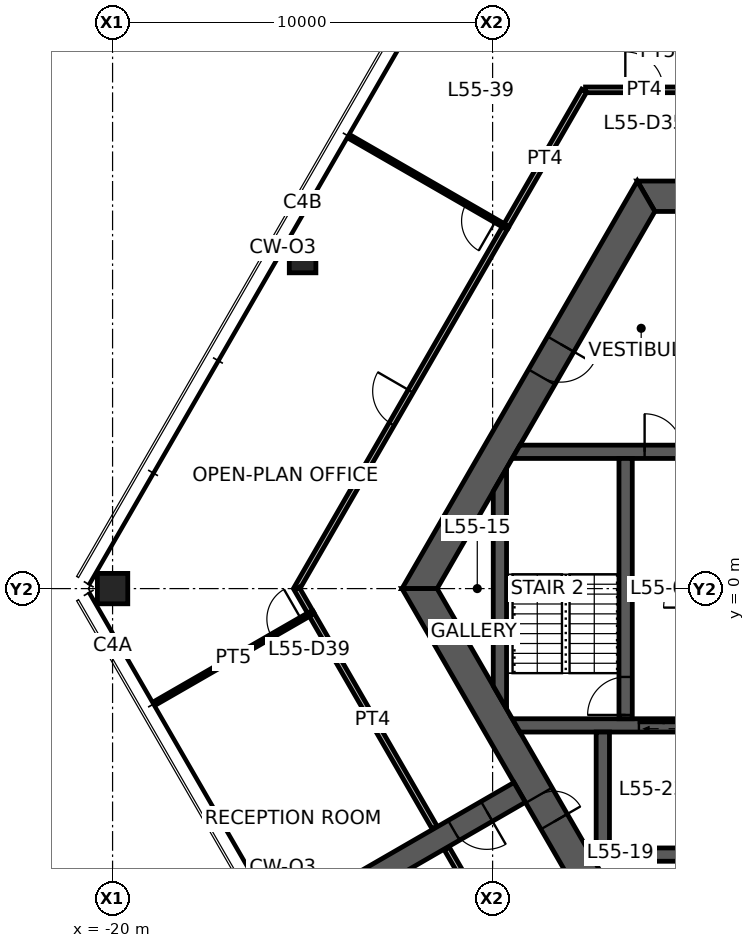
"""IFC4 building model, lengths in metres.
Left out: names, types, materials, properties, quantities, classifications, styles, units other than length and angle.
Written with IfcOpenShell. Run it as: python <this file> out.ifc"""

import sys

from ifc_helpers import new_model, si_unit, direction, frame, frame_2d, origin, origin_2d, place, context, subcontext, project, spatial, polyline, rectangle, hollow_rectangle, outline, extrude, element, fill, save


model = new_model("IFC4")
c1 = context("Model", 3, precision=1e-05, world=origin(), true_north=direction((0.0, 1.0)))
c2 = subcontext(c1, "Body", "Model", "MODEL_VIEW")
j1 = project(units=[si_unit("LENGTHUNIT", "METRE"), si_unit("PLANEANGLEUNIT", "RADIAN")], contexts=[c1])
p1 = place(None, origin())
s1 = spatial("IfcSite", under=j1, at=p1, CompositionType="ELEMENT")
p2 = place(p1, origin())
s2 = spatial("IfcBuilding", under=s1, at=p2, CompositionType="ELEMENT")
p3 = place(p2, frame((0.0, 0.0, 220.6)))
s3 = spatial("IfcBuildingStorey", under=s2, at=p3, CompositionType="ELEMENT", Elevation=220.6)
p4 = place(p3, frame((-20.0, 0.0, 0.0), z_axis=(0.0, 0.0, 1.0), x_axis=(1.0, 0.0, 0.0)))
e1 = element("IfcColumn", 1, at=p4, inside=s3, PredefinedType="COLUMN", context=c2, shape_type="SweptSolid", body=[
    extrude(hollow_rectangle(XDim=0.8, YDim=0.8, WallThickness=0.04, at=origin_2d()), origin(), (0.0, 0.0, 1.0), 3.9),
])
p5 = place(p3, frame((-15.0, 8.66, 0.0), z_axis=(0.0, 0.0, 1.0), x_axis=(1.0, 0.0, 0.0)))
e2 = element("IfcColumn", 2, at=p5, inside=s3, PredefinedType="COLUMN", context=c2, shape_type="SweptSolid", body=[
    extrude(hollow_rectangle(XDim=0.7, YDim=0.7, WallThickness=0.032, at=origin_2d()), origin(), (0.0, 0.0, 1.0), 3.9),
])
p6 = place(p3, frame((5.961, 10.325, 0.0), z_axis=(0.0, 0.0, 1.0), x_axis=(-1.0, 0.0, 0.0)))
e3 = element("IfcWall", 3, at=p6, inside=s3, PredefinedType="SHEAR", context=c2, shape_type="SweptSolid", body=[
    extrude(outline(polyline([(-0.231, -0.4), (4.649, -0.4), (5.549, -0.4), (6.374, -0.4), (7.273, -0.4), (12.153, -0.4), (11.691, 0.4), (7.273, 0.4), (6.374, 0.4), (5.549, 0.4), (4.649, 0.4), (0.231, 0.4), (-0.231, -0.4)])), origin(), (0.0, 0.0, 1.0), 3.9),
])
p7 = place(p6, frame((6.374, 0.0, 0.0)))
e4 = element("IfcOpeningElement", 4, at=p7, cuts=e3, PredefinedType="OPENING", context=c2, shape_type="SweptSolid", body=[
    extrude(rectangle(XDim=0.9, YDim=2.1, at=frame_2d((0.45, 1.05))), frame((0.0, 0.41, 0.0), z_axis=(0.0, -1.0, 0.0), x_axis=(1.0, 0.0, 0.0)), (0.0, 0.0, 1.0), 0.82),
])
p8 = place(p6, frame((4.649, 0.0, 0.0)))
e5 = element("IfcOpeningElement", 5, at=p8, cuts=e3, PredefinedType="OPENING", context=c2, shape_type="SweptSolid", body=[
    extrude(rectangle(XDim=0.9, YDim=2.1, at=frame_2d((0.45, 1.05))), frame((0.0, 0.41, 0.0), z_axis=(0.0, -1.0, 0.0), x_axis=(1.0, 0.0, 0.0)), (0.0, 0.0, 1.0), 0.82),
])
p9 = place(p3, frame((-5.961, 10.325, 0.0), z_axis=(0.0, 0.0, 1.0), x_axis=(-0.500004296715, -0.866022923061, 0.0)))
e6 = element("IfcWall", 6, at=p9, inside=s3, PredefinedType="SHEAR", context=c2, shape_type="SweptSolid", body=[
    extrude(outline(polyline([(-0.231, -0.4), (4.494, -0.4), (5.494, -0.4), (12.153, -0.4), (11.691, 0.4), (5.494, 0.4), (4.494, 0.4), (0.231, 0.4), (-0.231, -0.4)])), origin(), (0.0, 0.0, 1.0), 3.9),
])
p10 = place(p9, frame((4.494, 0.0, 0.0)))
e7 = element("IfcOpeningElement", 7, at=p10, cuts=e6, PredefinedType="OPENING", context=c2, shape_type="SweptSolid", body=[
    extrude(rectangle(XDim=1.0, YDim=2.1, at=frame_2d((0.5, 1.05))), frame((0.0, 0.41, 0.0), z_axis=(0.0, -1.0, 0.0), x_axis=(1.0, 0.0, 0.0)), (0.0, 0.0, 1.0), 0.82),
])
p11 = place(p3, frame((-11.922, 0.0, 0.0), z_axis=(0.0, 0.0, 1.0), x_axis=(0.500004296715, -0.866022923061, 0.0)))
e8 = element("IfcWall", 8, at=p11, inside=s3, PredefinedType="SHEAR", context=c2, shape_type="SweptSolid", body=[
    extrude(outline(polyline([(-0.231, -0.4), (6.281, -0.4), (7.081, -0.4), (12.153, -0.4), (11.691, 0.4), (7.081, 0.4), (6.281, 0.4), (0.231, 0.4), (-0.231, -0.4)])), origin(), (0.0, 0.0, 1.0), 3.9),
])
p12 = place(p11, frame((6.281, 0.0, 0.0)))
e9 = element("IfcOpeningElement", 9, at=p12, cuts=e8, PredefinedType="OPENING", context=c2, shape_type="SweptSolid", body=[
    extrude(rectangle(XDim=0.8, YDim=2.1, at=frame_2d((0.4, 1.05))), frame((0.0, 0.41, 0.0), z_axis=(0.0, -1.0, 0.0), x_axis=(1.0, 0.0, 0.0)), (0.0, 0.0, 1.0), 0.82),
])
p13 = place(p3, frame((-9.288, -5.363, 0.0), z_axis=(0.0, 0.0, 1.0), x_axis=(-0.866027473358, -0.499996415376, 0.0)))
e10 = element("IfcWall", 10, at=p13, inside=s3, PredefinedType="SHEAR", context=c2, shape_type="SweptSolid", body=[
    extrude(rectangle(XDim=7.045, YDim=0.6, at=frame_2d((3.523, 0.0))), origin(), (0.0, 0.0, 1.0), 3.9),
])
p14 = place(p13, frame((1.0, 0.0, 0.0)))
e11 = element("IfcOpeningElement", 11, at=p14, cuts=e10, PredefinedType="OPENING", context=c2, shape_type="SweptSolid", body=[
    extrude(rectangle(XDim=1.0, YDim=2.1, at=frame_2d((0.5, 1.05))), frame((0.0, 0.31, 0.0), z_axis=(0.0, -1.0, 0.0), x_axis=(1.0, 0.0, 0.0)), (0.0, 0.0, 1.0), 0.62),
])
p15 = place(p3, frame((-9.382, 3.6, 0.0), z_axis=(0.0, 0.0, 1.0), x_axis=(1.0, 0.0, 0.0)))
e12 = element("IfcWall", 12, at=p15, inside=s3, PredefinedType="SHEAR", context=c2, shape_type="SweptSolid", body=[
    extrude(outline(polyline([(-0.101, -0.175), (3.382, -0.175), (4.382, -0.175), (5.782, -0.175), (6.882, -0.175), (7.957, -0.175), (7.957, 0.175), (6.882, 0.175), (5.782, 0.175), (4.382, 0.175), (3.382, 0.175), (0.101, 0.175), (-0.101, -0.175)])), origin(), (0.0, 0.0, 1.0), 3.9),
])
p16 = place(p15, frame((3.382, 0.0, 0.0)))
e13 = element("IfcOpeningElement", 13, at=p16, cuts=e12, PredefinedType="OPENING", context=c2, shape_type="SweptSolid", body=[
    extrude(rectangle(XDim=1.0, YDim=2.1, at=frame_2d((0.5, 1.05))), frame((0.0, 0.185, 0.0), z_axis=(0.0, -1.0, 0.0), x_axis=(1.0, 0.0, 0.0)), (0.0, 0.0, 1.0), 0.37),
])
p17 = place(p15, frame((5.782, 0.0, 0.0)))
e14 = element("IfcOpeningElement", 14, at=p17, cuts=e12, PredefinedType="OPENING", context=c2, shape_type="SweptSolid", body=[
    extrude(rectangle(XDim=1.1, YDim=2.1, at=frame_2d((0.55, 1.05))), frame((0.0, 0.185, 0.0), z_axis=(0.0, -1.0, 0.0), x_axis=(1.0, 0.0, 0.0)), (0.0, 0.0, 1.0), 0.37),
])
p18 = place(p3, frame((-9.382, -3.6, 0.0), z_axis=(0.0, 0.0, 1.0), x_axis=(1.0, 0.0, 0.0)))
e15 = element("IfcWall", 15, at=p18, inside=s3, PredefinedType="SHEAR", context=c2, shape_type="SweptSolid", body=[
    extrude(outline(polyline([(0.101, -0.175), (3.232, -0.175), (4.532, -0.175), (5.782, -0.175), (6.882, -0.175), (7.957, -0.175), (7.957, 0.175), (6.882, 0.175), (5.782, 0.175), (4.532, 0.175), (3.232, 0.175), (-0.101, 0.175), (0.101, -0.175)])), origin(), (0.0, 0.0, 1.0), 3.9),
])
p19 = place(p18, frame((5.782, 0.0, 0.0)))
e16 = element("IfcOpeningElement", 16, at=p19, cuts=e15, PredefinedType="OPENING", context=c2, shape_type="SweptSolid", body=[
    extrude(rectangle(XDim=1.1, YDim=2.1, at=frame_2d((0.55, 1.05))), frame((0.0, 0.185, 0.0), z_axis=(0.0, -1.0, 0.0), x_axis=(1.0, 0.0, 0.0)), (0.0, 0.0, 1.0), 0.37),
])
p20 = place(p18, frame((3.232, 0.0, 0.0)))
e17 = element("IfcOpeningElement", 17, at=p20, cuts=e15, PredefinedType="OPENING", context=c2, shape_type="SweptSolid", body=[
    extrude(rectangle(XDim=1.3, YDim=2.1, at=frame_2d((0.65, 1.05))), frame((0.0, 0.185, 0.0), z_axis=(0.0, -1.0, 0.0), x_axis=(1.0, 0.0, 0.0)), (0.0, 0.0, 1.0), 0.37),
])
p21 = place(p3, frame((-6.5, -3.425, 0.0), z_axis=(0.0, 0.0, 1.0), x_axis=(0.0, 1.0, 0.0)))
e18 = element("IfcWall", 18, at=p21, inside=s3, PredefinedType="SHEAR", context=c2, shape_type="SweptSolid", body=[
    extrude(rectangle(XDim=6.85, YDim=0.35, at=frame_2d((3.425, 0.0))), origin(), (0.0, 0.0, 1.0), 3.9),
])
p22 = place(p21, frame((0.1, 0.0, 0.0)))
e19 = element("IfcOpeningElement", 19, at=p22, cuts=e18, PredefinedType="OPENING", context=c2, shape_type="SweptSolid", body=[
    extrude(rectangle(XDim=1.0, YDim=2.1, at=frame_2d((0.5, 1.05))), frame((0.0, 0.185, 0.0), z_axis=(0.0, -1.0, 0.0), x_axis=(1.0, 0.0, 0.0)), (0.0, 0.0, 1.0), 0.37),
])
p23 = place(p3, frame((-7.275, -7.0, 0.0), z_axis=(0.0, 0.0, 1.0), x_axis=(1.0, 0.0, 0.0)))
e20 = element("IfcWall", 20, at=p23, inside=s3, PredefinedType="SHEAR", context=c2, shape_type="SweptSolid", body=[
    extrude(rectangle(XDim=2.6, YDim=0.35, at=frame_2d((1.3, 0.0))), origin(), (0.0, 0.0, 1.0), 3.9),
])
p24 = place(p3, frame((-7.1, -3.775, 0.0), z_axis=(0.0, 0.0, 1.0), x_axis=(0.0, -1.0, 0.0)))
e21 = element("IfcWall", 21, at=p24, inside=s3, PredefinedType="SHEAR", context=c2, shape_type="SweptSolid", body=[
    extrude(rectangle(XDim=3.05, YDim=0.35, at=frame_2d((1.525, 0.0))), origin(), (0.0, 0.0, 1.0), 3.9),
])
p25 = place(p3, frame((-9.808, -2.862, 0.0), z_axis=(0.0, 0.0, 1.0), x_axis=(0.0, 1.0, 0.0)))
e22 = element("IfcWall", 22, at=p25, inside=s3, PredefinedType="SHEAR", context=c2, shape_type="SweptSolid", body=[
    extrude(outline(polyline([(-0.303, -0.175), (6.028, -0.175), (5.421, 0.175), (0.303, 0.175), (-0.303, -0.175)])), origin(), (0.0, 0.0, 1.0), 3.9),
])
p26 = place(p3, frame((-7.555, 13.125, 0.0), z_axis=(0.0, 0.0, 1.0), x_axis=(1.0, 0.0, 0.0)))
e23 = element("IfcWall", 23, at=p26, inside=s3, PredefinedType="PARTITIONING", context=c2, shape_type="SweptSolid", body=[
    extrude(rectangle(XDim=3.094, YDim=0.15, at=frame_2d((1.547, 0.0))), origin(), (0.0, 0.0, 1.0), 2.95),
])
p27 = place(p26, frame((1.047, 0.0, 0.0)))
e24 = element("IfcOpeningElement", 24, at=p27, cuts=e23, PredefinedType="OPENING", context=c2, shape_type="SweptSolid", body=[
    extrude(rectangle(XDim=1.0, YDim=2.1, at=frame_2d((0.5, 1.05))), frame((0.0, 0.085, 0.0), z_axis=(0.0, -1.0, 0.0), x_axis=(1.0, 0.0, 0.0)), (0.0, 0.0, 1.0), 0.17),
])
p28 = place(p3, frame((-9.661, 9.516, 0.0), z_axis=(0.0, 0.0, 1.0), x_axis=(0.499997836828, 0.866026652689, 0.0)))
e25 = element("IfcWall", 25, at=p28, inside=s3, PredefinedType="PARTITIONING", context=c2, shape_type="SweptSolid", body=[
    extrude(rectangle(XDim=4.144, YDim=0.15, at=frame_2d((2.072, 0.0))), origin(), (0.0, 0.0, 1.0), 2.95),
])
p29 = place(p3, frame((-11.527, -6.285, 0.0), z_axis=(0.0, 0.0, 1.0), x_axis=(-0.500003537243, 0.866023361547, 0.0)))
e26 = element("IfcWall", 26, at=p29, inside=s3, PredefinedType="PARTITIONING", context=c2, shape_type="SweptSolid", body=[
    extrude(rectangle(XDim=6.516, YDim=0.15, at=frame_2d((3.258, 0.0))), origin(), (0.0, 0.0, 1.0), 2.95),
])
p30 = place(p3, frame((-15.156, 0.0, 0.0), z_axis=(0.0, 0.0, 1.0), x_axis=(0.500006847747, 0.8660214502, 0.0)))
e27 = element("IfcWall", 27, at=p30, inside=s3, PredefinedType="PARTITIONING", context=c2, shape_type="SweptSolid", body=[
    extrude(rectangle(XDim=10.998, YDim=0.15, at=frame_2d((5.499, 0.0))), origin(), (0.0, 0.0, 1.0), 2.95),
])
p31 = place(p30, frame((4.999, 0.0, 0.0)))
e28 = element("IfcOpeningElement", 28, at=p31, cuts=e27, PredefinedType="OPENING", context=c2, shape_type="SweptSolid", body=[
    extrude(rectangle(XDim=1.0, YDim=2.1, at=frame_2d((0.5, 1.05))), frame((0.0, 0.085, 0.0), z_axis=(0.0, -1.0, 0.0), x_axis=(1.0, 0.0, 0.0)), (0.0, 0.0, 1.0), 0.17),
])
p32 = place(p3, frame((-14.78, -0.651, 0.0), z_axis=(0.0, 0.0, 1.0), x_axis=(-0.500088105676, 0.865974529972, 0.0)))
e29 = element("IfcWall", 29, at=p32, inside=s3, PredefinedType="PARTITIONING", context=c2, shape_type="SweptSolid", body=[
    extrude(rectangle(XDim=0.751, YDim=0.15, at=frame_2d((0.375, 0.0))), origin(), (0.0, 0.0, 1.0), 2.95),
])
p33 = place(p3, frame((-9.656, 9.524, 0.0), z_axis=(0.0, 0.0, 1.0), x_axis=(-0.866526579402, 0.499130931911, 0.0)))
e30 = element("IfcWall", 30, at=p33, inside=s3, PredefinedType="PARTITIONING", context=c2, shape_type="SweptSolid", body=[
    extrude(rectangle(XDim=4.705, YDim=0.1, at=frame_2d((2.353, 0.0))), origin(), (0.0, 0.0, 1.0), 2.95),
])
p34 = place(p33, frame((0.3, 0.0, 0.0)))
e31 = element("IfcOpeningElement", 31, at=p34, cuts=e30, PredefinedType="OPENING", context=c2, shape_type="SweptSolid", body=[
    extrude(rectangle(XDim=0.9, YDim=2.1, at=frame_2d((0.45, 1.05))), frame((0.0, 0.06, 0.0), z_axis=(0.0, -1.0, 0.0), x_axis=(1.0, 0.0, 0.0)), (0.0, 0.0, 1.0), 0.12),
])
p35 = place(p3, frame((-18.857, -3.0, 0.0), z_axis=(0.0, 0.0, 1.0), x_axis=(0.866504138439, 0.499169888984, 0.0)))
e32 = element("IfcWall", 32, at=p35, inside=s3, PredefinedType="PARTITIONING", context=c2, shape_type="SweptSolid", body=[
    extrude(rectangle(XDim=4.706, YDim=0.1, at=frame_2d((2.353, 0.0))), origin(), (0.0, 0.0, 1.0), 2.95),
])
p36 = place(p35, frame((3.506, 0.0, 0.0)))
e33 = element("IfcOpeningElement", 33, at=p36, cuts=e32, PredefinedType="OPENING", context=c2, shape_type="SweptSolid", body=[
    extrude(rectangle(XDim=0.9, YDim=2.1, at=frame_2d((0.45, 1.05))), frame((0.0, 0.06, 0.0), z_axis=(0.0, -1.0, 0.0), x_axis=(1.0, 0.0, 0.0)), (0.0, 0.0, 1.0), 0.12),
])
p37 = place(p3, frame((-7.589, -13.105, 0.0), z_axis=(0.0, 0.0, 1.0), x_axis=(-0.499986333712, 0.866033293876, 0.0)))
e34 = element("IfcWall", 34, at=p37, inside=s3, PredefinedType="PARTITIONING", context=c2, shape_type="SweptSolid", body=[
    extrude(rectangle(XDim=7.235, YDim=0.15, at=frame_2d((3.617, 0.0))), origin(), (0.0, 0.0, 1.0), 2.95),
])
p38 = place(p37, frame((3.117, 0.0, 0.0)))
e35 = element("IfcOpeningElement", 35, at=p38, cuts=e34, PredefinedType="OPENING", context=c2, shape_type="SweptSolid", body=[
    extrude(rectangle(XDim=1.0, YDim=2.1, at=frame_2d((0.5, 1.05))), frame((0.0, 0.085, 0.0), z_axis=(0.0, -1.0, 0.0), x_axis=(1.0, 0.0, 0.0)), (0.0, 0.0, 1.0), 0.17),
])
p39 = place(p12, origin())
e36 = element("IfcDoor", 36, at=p39, inside=s3, OperationType="SINGLE_SWING_RIGHT", PredefinedType="DOOR", context=c2, shape_type="SweptSolid", body=[
    extrude(rectangle(XDim=0.8, YDim=2.1, at=frame_2d((0.4, 1.05))), frame((0.0, 0.025, 0.0), z_axis=(0.0, -1.0, 0.0), x_axis=(1.0, 0.0, 0.0)), (0.0, 0.0, 1.0), 0.05),
])
fill(e9, e36)
p40 = place(p10, origin())
e37 = element("IfcDoor", 37, at=p40, inside=s3, OperationType="SINGLE_SWING_LEFT", PredefinedType="DOOR", context=c2, shape_type="SweptSolid", body=[
    extrude(rectangle(XDim=1.0, YDim=2.1, at=frame_2d((0.5, 1.05))), frame((0.0, 0.025, 0.0), z_axis=(0.0, -1.0, 0.0), x_axis=(1.0, 0.0, 0.0)), (0.0, 0.0, 1.0), 0.05),
])
fill(e7, e37)
p41 = place(p22, origin())
e38 = element("IfcDoor", 38, at=p41, inside=s3, OperationType="SINGLE_SWING_LEFT", PredefinedType="DOOR", context=c2, shape_type="SweptSolid", body=[
    extrude(rectangle(XDim=1.0, YDim=2.1, at=frame_2d((0.5, 1.05))), frame((0.0, 0.025, 0.0), z_axis=(0.0, -1.0, 0.0), x_axis=(1.0, 0.0, 0.0)), (0.0, 0.0, 1.0), 0.05),
])
fill(e19, e38)
p42 = place(p16, origin())
e39 = element("IfcDoor", 39, at=p42, inside=s3, OperationType="SINGLE_SWING_LEFT", PredefinedType="DOOR", context=c2, shape_type="SweptSolid", body=[
    extrude(rectangle(XDim=1.0, YDim=2.1, at=frame_2d((0.5, 1.05))), frame((0.0, 0.025, 0.0), z_axis=(0.0, -1.0, 0.0), x_axis=(1.0, 0.0, 0.0)), (0.0, 0.0, 1.0), 0.05),
])
fill(e13, e39)
p43 = place(p14, origin())
e40 = element("IfcDoor", 40, at=p43, inside=s3, OperationType="SINGLE_SWING_LEFT", PredefinedType="DOOR", context=c2, shape_type="SweptSolid", body=[
    extrude(rectangle(XDim=1.0, YDim=2.1, at=frame_2d((0.5, 1.05))), frame((0.0, 0.025, 0.0), z_axis=(0.0, -1.0, 0.0), x_axis=(1.0, 0.0, 0.0)), (0.0, 0.0, 1.0), 0.05),
])
fill(e11, e40)
p44 = place(p27, origin())
e41 = element("IfcDoor", 41, at=p44, inside=s3, OperationType="SINGLE_SWING_LEFT", PredefinedType="DOOR", context=c2, shape_type="SweptSolid", body=[
    extrude(rectangle(XDim=1.0, YDim=2.1, at=frame_2d((0.5, 1.05))), frame((0.0, 0.025, 0.0), z_axis=(0.0, -1.0, 0.0), x_axis=(1.0, 0.0, 0.0)), (0.0, 0.0, 1.0), 0.05),
])
fill(e24, e41)
p45 = place(p31, origin())
e42 = element("IfcDoor", 42, at=p45, inside=s3, OperationType="SINGLE_SWING_RIGHT", PredefinedType="DOOR", context=c2, shape_type="SweptSolid", body=[
    extrude(rectangle(XDim=1.0, YDim=2.1, at=frame_2d((0.5, 1.05))), frame((0.0, 0.025, 0.0), z_axis=(0.0, -1.0, 0.0), x_axis=(1.0, 0.0, 0.0)), (0.0, 0.0, 1.0), 0.05),
])
fill(e28, e42)
p46 = place(p34, origin())
e43 = element("IfcDoor", 43, at=p46, inside=s3, OperationType="SINGLE_SWING_LEFT", PredefinedType="DOOR", context=c2, shape_type="SweptSolid", body=[
    extrude(rectangle(XDim=0.9, YDim=2.1, at=frame_2d((0.45, 1.05))), frame((0.0, 0.025, 0.0), z_axis=(0.0, -1.0, 0.0), x_axis=(1.0, 0.0, 0.0)), (0.0, 0.0, 1.0), 0.05),
])
fill(e31, e43)
p47 = place(p36, origin())
e44 = element("IfcDoor", 44, at=p47, inside=s3, OperationType="SINGLE_SWING_RIGHT", PredefinedType="DOOR", context=c2, shape_type="SweptSolid", body=[
    extrude(rectangle(XDim=0.9, YDim=2.1, at=frame_2d((0.45, 1.05))), frame((0.0, 0.025, 0.0), z_axis=(0.0, -1.0, 0.0), x_axis=(1.0, 0.0, 0.0)), (0.0, 0.0, 1.0), 0.05),
])
fill(e33, e44)
p48 = place(p20, origin())
e45 = element("IfcDoor", 45, at=p48, inside=s3, OperationType="DOUBLE_DOOR_SLIDING", PredefinedType="DOOR", context=c2, shape_type="SweptSolid", body=[
    extrude(rectangle(XDim=1.3, YDim=2.1, at=frame_2d((0.65, 1.05))), frame((0.0, 0.025, 0.0), z_axis=(0.0, -1.0, 0.0), x_axis=(1.0, 0.0, 0.0)), (0.0, 0.0, 1.0), 0.05),
])
fill(e17, e45)
save(model, sys.argv[1])
